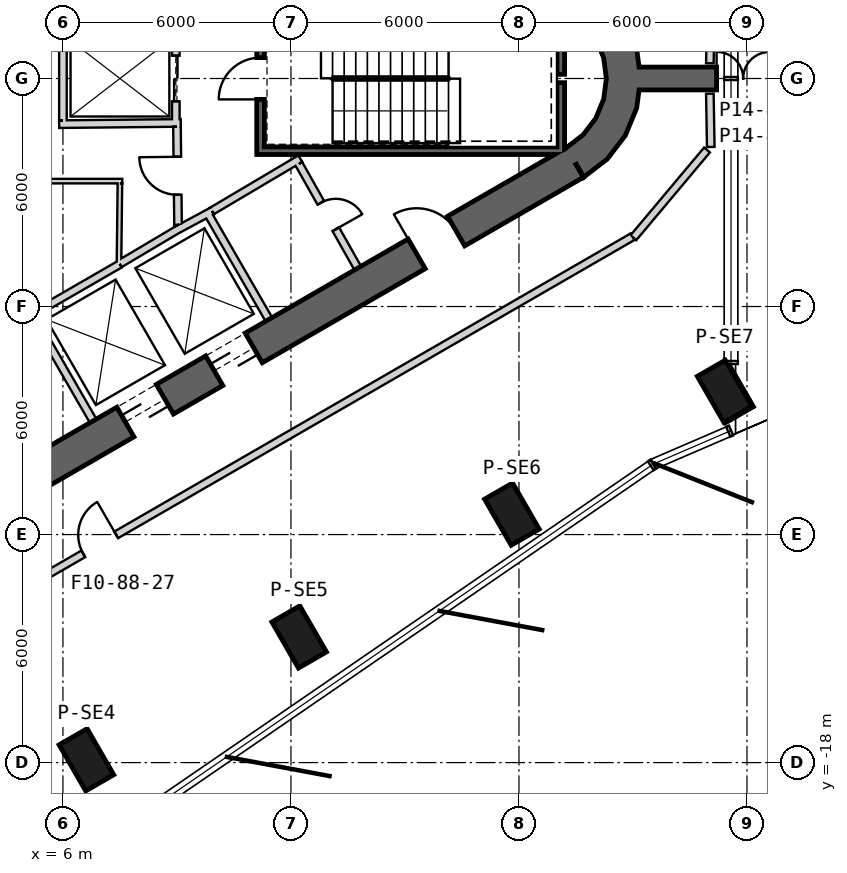
"""IFC4 building model, lengths in metres.
Left out: names, types, materials, properties, quantities, classifications, styles, units other than length and angle.
Written with IfcOpenShell. Run it as: python <this file> out.ifc"""

import sys

from ifc_helpers import new_model, si_unit, direction, frame, frame_2d, origin, origin_2d, place, context, subcontext, project, spatial, polyline, rectangle, outline, extrude, element, fill, save


model = new_model("IFC4")
c1 = context("Model", 3, precision=1e-05, world=origin(), true_north=direction((0.0, 1.0)))
c2 = subcontext(c1, "Body", "Model", "MODEL_VIEW")
j1 = project(units=[si_unit("LENGTHUNIT", "METRE"), si_unit("PLANEANGLEUNIT", "RADIAN")], contexts=[c1])
p1 = place(None, origin())
s1 = spatial("IfcSite", under=j1, at=p1, CompositionType="ELEMENT")
p2 = place(p1, origin())
s2 = spatial("IfcBuilding", under=s1, at=p2, CompositionType="ELEMENT")
p3 = place(p2, frame((0.0, 0.0, 380.6)))
s3 = spatial("IfcBuildingStorey", under=s2, at=p3, CompositionType="ELEMENT", Elevation=380.6)
for number, where, z_axis, x_axis in (
    (1, (6.618, -17.927, 0.0), (0.0, 0.0, 1.0), (0.5, -0.866, 0.0)),
    (2, (12.216, -14.695, 0.0), (0.0, 0.0, 1.0), (0.5, -0.866, 0.0)),
    (3, (17.814, -11.463, 0.0), (0.0, 0.0, 1.0), (0.5, -0.866, 0.0)),
    (4, (23.412, -8.231, 0.0), (0.0, 0.0, 1.0), (0.5, -0.866, 0.0)),
):
    element("IfcColumn", number, at=place(p3, frame(where, z_axis=z_axis, x_axis=x_axis)), inside=s3, PredefinedType="COLUMN", context=c2, shape_type="SweptSolid", body=[
        extrude(rectangle(XDim=1.4, YDim=0.85, at=origin_2d()), origin(), (0.0, 0.0, 1.0), 3.9),
    ])
p4 = place(p3, frame((-7.825, -17.97, 0.0), z_axis=(0.0, 0.0, 1.0), x_axis=(0.866028369851, 0.499994862586, 0.0)))
e5 = element("IfcWall", 5, at=p4, inside=s3, PredefinedType="SHEAR", context=c2, shape_type="SweptSolid", body=[
    extrude(rectangle(XDim=31.523, YDim=0.9, at=frame_2d((15.762, 0.0))), origin(), (0.0, 0.0, 1.0), 3.9),
])
p5 = place(p4, frame((17.862, 0.0, 0.0)))
e6 = element("IfcOpeningElement", 6, at=p5, cuts=e5, PredefinedType="OPENING", context=c2, shape_type="SweptSolid", body=[
    extrude(rectangle(XDim=1.2, YDim=2.4, at=frame_2d((0.6, 1.2))), frame((0.0, 0.46, 0.0), z_axis=(0.0, -1.0, 0.0), x_axis=(1.0, 0.0, 0.0)), (0.0, 0.0, 1.0), 0.92),
])
p6 = place(p4, frame((20.562, 0.0, 0.0)))
e7 = element("IfcOpeningElement", 7, at=p6, cuts=e5, PredefinedType="OPENING", context=c2, shape_type="SweptSolid", body=[
    extrude(rectangle(XDim=1.2, YDim=2.4, at=frame_2d((0.6, 1.2))), frame((0.0, 0.46, 0.0), z_axis=(0.0, -1.0, 0.0), x_axis=(1.0, 0.0, 0.0)), (0.0, 0.0, 1.0), 0.92),
])
p7 = place(p4, frame((26.712, 0.0, 0.0)))
e8 = element("IfcOpeningElement", 8, at=p7, cuts=e5, PredefinedType="OPENING", context=c2, shape_type="SweptSolid", body=[
    extrude(rectangle(XDim=1.2, YDim=2.4, at=frame_2d((0.6, 1.2))), frame((0.0, 0.46, 0.0), z_axis=(0.0, -1.0, 0.0), x_axis=(1.0, 0.0, 0.0)), (0.0, 0.0, 1.0), 0.92),
])
p8 = place(p4, frame((3.612, 0.0, 0.0)))
e9 = element("IfcOpeningElement", 9, at=p8, cuts=e5, PredefinedType="OPENING", context=c2, shape_type="SweptSolid", body=[
    extrude(rectangle(XDim=1.2, YDim=2.4, at=frame_2d((0.6, 1.2))), frame((0.0, 0.46, 0.0), z_axis=(0.0, -1.0, 0.0), x_axis=(1.0, 0.0, 0.0)), (0.0, 0.0, 1.0), 0.92),
])
p9 = place(p3, origin())
e10 = element("IfcWall", 10, at=p9, inside=s3, PredefinedType="SHEAR", context=c2, shape_type="SweptSolid", body=[
    extrude(outline(polyline([(19.7, -2.598), (20.321, -2.121), (20.798, -1.5), (21.098, -0.777), (21.2, 0.0), (21.098, 0.777), (20.798, 1.5), (20.321, 2.121), (19.7, 2.598), (19.25, 1.819), (19.685, 1.485), (20.019, 1.05), (20.229, 0.543), (20.3, 0.0), (20.229, -0.543), (20.019, -1.05), (19.685, -1.485), (19.25, -1.819), (19.7, -2.598)])), origin(), (0.0, 0.0, 1.0), 3.9),
])
p10 = place(p3, frame((21.15, 0.0, 0.0), z_axis=(0.0, 0.0, 1.0), x_axis=(1.0, 0.0, 0.0)))
e11 = element("IfcWall", 11, at=p10, inside=s3, PredefinedType="SHEAR", context=c2, shape_type="SweptSolid", body=[
    extrude(rectangle(XDim=6.455, YDim=0.6, at=frame_2d((3.228, 0.0))), origin(), (0.0, 0.0, 1.0), 3.9),
])
p11 = place(p10, frame((2.05, 0.0, 0.0)))
e12 = element("IfcOpeningElement", 12, at=p11, cuts=e11, PredefinedType="OPENING", context=c2, shape_type="SweptSolid", body=[
    extrude(rectangle(XDim=1.4, YDim=2.4, at=frame_2d((0.7, 1.2))), frame((0.0, 0.31, 0.0), z_axis=(0.0, -1.0, 0.0), x_axis=(1.0, 0.0, 0.0)), (0.0, 0.0, 1.0), 0.62),
])
p12 = place(p3, frame((23.426, -7.345, 1.1), z_axis=(0.0, 0.0, 1.0), x_axis=(0.499991248344, -0.866030456496, 0.0)))
e13 = element("IfcWall", 13, at=p12, inside=s3, PredefinedType="SOLIDWALL", context=c2, shape_type="SweptSolid", body=[
    extrude(rectangle(XDim=1.52, YDim=0.06, at=frame_2d((0.76, 0.0))), origin(), (0.0, 0.0, 1.0), 1.51),
])
p13 = place(p3, frame((23.409, -9.075, 0.9), z_axis=(0.0, 0.0, 1.0), x_axis=(0.865989465428, 0.500062241894, 0.0)))
e14 = element("IfcWall", 14, at=p13, inside=s3, PredefinedType="SOLIDWALL", context=c2, shape_type="SweptSolid", body=[
    extrude(rectangle(XDim=0.85, YDim=0.06, at=frame_2d((0.425, 0.0))), origin(), (0.0, 0.0, 1.0), 2.7),
])
p14 = place(p3, frame((6.795, -9.01, 0.0), z_axis=(0.0, 0.0, 1.0), x_axis=(-0.499984717929, 0.866034226713, 0.0)))
e15 = element("IfcWall", 15, at=p14, inside=s3, PredefinedType="PLUMBINGWALL", context=c2, shape_type="SweptSolid", body=[
    extrude(rectangle(XDim=3.25, YDim=0.2, at=frame_2d((1.625, 0.0))), origin(), (0.0, 0.0, 1.0), 3.6),
])
p15 = place(p3, frame((5.159, -6.236, 0.0), z_axis=(0.0, 0.0, 1.0), x_axis=(0.866036505625, 0.499980770555, 0.0)))
e16 = element("IfcWall", 16, at=p15, inside=s3, PredefinedType="PLUMBINGWALL", context=c2, shape_type="SweptSolid", body=[
    extrude(rectangle(XDim=2.7, YDim=0.2, at=frame_2d((1.35, 0.0))), origin(), (0.0, 0.0, 1.0), 3.6),
])
p16 = place(p3, frame((9.795, -3.525, 0.0), z_axis=(0.0, 0.0, 1.0), x_axis=(0.499984717929, -0.866034226713, 0.0)))
e17 = element("IfcWall", 17, at=p16, inside=s3, PredefinedType="PLUMBINGWALL", context=c2, shape_type="SweptSolid", body=[
    extrude(rectangle(XDim=3.25, YDim=0.2, at=frame_2d((1.625, 0.0))), origin(), (0.0, 0.0, 1.0), 3.6),
])
p17 = place(p3, frame((8.974, -3.999, 0.0), z_axis=(0.0, 0.0, 1.0), x_axis=(0.880907015104, 0.473289373154, 0.0)))
e18 = element("IfcWall", 18, at=p17, inside=s3, PredefinedType="PLUMBINGWALL", context=c2, shape_type="SweptSolid", body=[
    extrude(rectangle(XDim=1.078, YDim=0.2, at=frame_2d((0.539, 0.0))), origin(), (0.0, 0.0, 1.0), 3.6),
])
p18 = place(p3, frame((7.497, -4.886, 0.0), z_axis=(0.0, 0.0, 1.0), x_axis=(0.857516281273, 0.51445682749, 0.0)))
e19 = element("IfcWall", 19, at=p18, inside=s3, PredefinedType="PLUMBINGWALL", context=c2, shape_type="SweptSolid", body=[
    extrude(rectangle(XDim=1.845, YDim=0.2, at=frame_2d((0.922, 0.0))), origin(), (0.0, 0.0, 1.0), 3.6),
])
p19 = place(p3, frame((19.1, -2.0, -0.3), z_axis=(0.0, 0.0, 1.0), x_axis=(0.0, 1.0, 0.0)))
e20 = element("IfcWall", 20, at=p19, inside=s3, PredefinedType="SHEAR", context=c2, shape_type="SweptSolid", body=[
    extrude(rectangle(XDim=1.89, YDim=0.2, at=frame_2d((0.945, 0.0))), origin(), (0.0, 0.0, 1.0), 3.9),
])
p20 = place(p3, frame((19.1, 0.11, -0.3), z_axis=(0.0, 0.0, 1.0), x_axis=(0.0, 1.0, 0.0)))
e21 = element("IfcWall", 21, at=p20, inside=s3, PredefinedType="SHEAR", context=c2, shape_type="SweptSolid", body=[
    extrude(rectangle(XDim=1.69, YDim=0.2, at=frame_2d((0.845, 0.0))), origin(), (0.0, 0.0, 1.0), 3.9),
])
p21 = place(p3, frame((11.1, -1.9, -0.3), z_axis=(0.0, 0.0, 1.0), x_axis=(1.0, 0.0, 0.0)))
e22 = element("IfcWall", 22, at=p21, inside=s3, PredefinedType="SHEAR", context=c2, shape_type="SweptSolid", body=[
    extrude(rectangle(XDim=7.9, YDim=0.2, at=frame_2d((3.95, 0.0))), origin(), (0.0, 0.0, 1.0), 3.9),
])
p22 = place(p3, frame((11.2, -1.8, -0.3), z_axis=(0.0, 0.0, 1.0), x_axis=(0.0, 1.0, 0.0)))
e23 = element("IfcWall", 23, at=p22, inside=s3, PredefinedType="SHEAR", context=c2, shape_type="SweptSolid", body=[
    extrude(rectangle(XDim=3.6, YDim=0.2, at=frame_2d((1.8, 0.0))), origin(), (0.0, 0.0, 1.0), 3.9),
])
p23 = place(p22, frame((1.25, 0.0, 0.3)))
e24 = element("IfcOpeningElement", 24, at=p23, cuts=e23, PredefinedType="OPENING", context=c2, shape_type="SweptSolid", body=[
    extrude(rectangle(XDim=1.1, YDim=2.1, at=frame_2d((0.55, 1.05))), frame((0.0, 0.11, 0.0), z_axis=(0.0, -1.0, 0.0), x_axis=(1.0, 0.0, 0.0)), (0.0, 0.0, 1.0), 0.22),
])
p24 = place(p3, frame((8.97, 1.2, 0.0), z_axis=(0.0, 0.0, 1.0), x_axis=(0.0, -1.0, 0.0)))
e25 = element("IfcWall", 25, at=p24, inside=s3, PredefinedType="PLUMBINGWALL", context=c2, shape_type="SweptSolid", body=[
    extrude(rectangle(XDim=2.4, YDim=0.2, at=frame_2d((1.2, 0.0))), origin(), (0.0, 0.0, 1.0), 3.6),
])
p25 = place(p24, frame((0.6, 0.0, 0.0)))
e26 = element("IfcOpeningElement", 26, at=p25, cuts=e25, PredefinedType="OPENING", context=c2, shape_type="SweptSolid", body=[
    extrude(rectangle(XDim=1.2, YDim=2.4, at=frame_2d((0.6, 1.2))), frame((0.0, 0.11, 0.0), z_axis=(0.0, -1.0, 0.0), x_axis=(1.0, 0.0, 0.0)), (0.0, 0.0, 1.0), 0.22),
])
p26 = place(p3, frame((9.1, -1.169, 0.0), z_axis=(0.0, 0.0, 1.0), x_axis=(-0.999949988, -0.010001074852, 0.0)))
e27 = element("IfcWall", 27, at=p26, inside=s3, PredefinedType="PLUMBINGWALL", context=c2, shape_type="SweptSolid", body=[
    extrude(rectangle(XDim=3.1, YDim=0.2, at=frame_2d((1.55, 0.0))), origin(), (0.0, 0.0, 1.0), 3.6),
])
p27 = place(p3, frame((6.0, -1.104, 0.0), z_axis=(0.0, 0.0, 1.0), x_axis=(0.0, 1.0, 0.0)))
e28 = element("IfcWall", 28, at=p27, inside=s3, PredefinedType="PLUMBINGWALL", context=c2, shape_type="SweptSolid", body=[
    extrude(rectangle(XDim=2.405, YDim=0.2, at=frame_2d((1.202, 0.0))), origin(), (0.0, 0.0, 1.0), 3.6),
])
p28 = place(p3, frame((12.245, -2.109, 0.0), z_axis=(0.0, 0.0, 1.0), x_axis=(-0.860414880418, -0.509594185166, 0.0)))
e29 = element("IfcWall", 29, at=p28, inside=s3, PredefinedType="PARTITIONING", context=c2, shape_type="SweptSolid", body=[
    extrude(rectangle(XDim=2.7, YDim=0.2, at=frame_2d((1.35, 0.0))), origin(), (0.0, 0.0, 1.0), 3.6),
])
p29 = place(p3, frame((13.758, -4.99, 0.0), z_axis=(0.0, 0.0, 1.0), x_axis=(-0.491993409184, 0.87059892334, 0.0)))
e30 = element("IfcWall", 30, at=p29, inside=s3, PredefinedType="PARTITIONING", context=c2, shape_type="SweptSolid", body=[
    extrude(rectangle(XDim=3.15, YDim=0.2, at=frame_2d((1.575, 0.0))), origin(), (0.0, 0.0, 1.0), 3.6),
])
p30 = place(p29, frame((1.175, 0.0, 0.0)))
e31 = element("IfcOpeningElement", 31, at=p30, cuts=e30, PredefinedType="OPENING", context=c2, shape_type="SweptSolid", body=[
    extrude(rectangle(XDim=0.8, YDim=2.1, at=frame_2d((0.4, 1.05))), frame((0.0, 0.11, 0.0), z_axis=(0.0, -1.0, 0.0), x_axis=(1.0, 0.0, 0.0)), (0.0, 0.0, 1.0), 0.22),
])
p31 = place(p3, frame((9.029, -3.851, 0.0), z_axis=(0.0, 0.0, 1.0), x_axis=(-0.010784614026, 0.999941844359, 0.0)))
e32 = element("IfcWall", 32, at=p31, inside=s3, PredefinedType="PARTITIONING", context=c2, shape_type="SweptSolid", body=[
    extrude(rectangle(XDim=2.581, YDim=0.2, at=frame_2d((1.291, 0.0))), origin(), (0.0, 0.0, 1.0), 3.6),
])
p32 = place(p3, frame((5.9, -1.03, 0.0), z_axis=(0.0, 0.0, 1.0), x_axis=(-1.0, 0.0, 0.0)))
e33 = element("IfcWall", 33, at=p32, inside=s3, PredefinedType="PLUMBINGWALL", context=c2, shape_type="SweptSolid", body=[
    extrude(rectangle(XDim=0.4, YDim=0.15, at=frame_2d((0.2, 0.0))), origin(), (0.0, 0.0, 1.0), 3.6),
])
p33 = place(p3, frame((23.023, 0.4, 0.0), z_axis=(0.0, 0.0, 1.0), x_axis=(0.017073489471, 0.999854237355, 0.0)))
e34 = element("IfcWall", 34, at=p33, inside=s3, PredefinedType="PARTITIONING", context=c2, shape_type="SweptSolid", body=[
    extrude(rectangle(XDim=1.273, YDim=0.12, at=frame_2d((0.636, 0.0))), origin(), (0.0, 0.0, 1.0), 3.6),
])
p34 = place(p3, frame((0.669, -15.895, 0.0), z_axis=(0.0, 0.0, 1.0), x_axis=(0.866018980909, 0.500011124582, 0.0)))
e35 = element("IfcWall", 35, at=p34, inside=s3, PredefinedType="PARTITIONING", context=c2, shape_type="SweptSolid", body=[
    extrude(rectangle(XDim=6.808, YDim=0.2, at=frame_2d((3.404, 0.0))), origin(), (0.0, 0.0, 1.0), 3.07),
])
p35 = place(p34, frame((3.056, 0.0, 0.0)))
e36 = element("IfcOpeningElement", 36, at=p35, cuts=e35, PredefinedType="OPENING", context=c2, shape_type="SweptSolid", body=[
    extrude(rectangle(XDim=1.0, YDim=2.1, at=frame_2d((0.5, 1.05))), frame((0.0, 0.11, 0.0), z_axis=(0.0, -1.0, 0.0), x_axis=(1.0, 0.0, 0.0)), (0.0, 0.0, 1.0), 0.22),
])
p36 = place(p3, frame((6.565, -12.491, 0.0), z_axis=(0.0, 0.0, 1.0), x_axis=(0.866025195272, 0.500000361154, 0.0)))
e37 = element("IfcWall", 37, at=p36, inside=s3, PredefinedType="PARTITIONING", context=c2, shape_type="SweptSolid", body=[
    extrude(rectangle(XDim=16.654, YDim=0.2, at=frame_2d((8.327, 0.0))), origin(), (0.0, 0.0, 1.0), 2.97),
])
p37 = place(p36, frame((7.856, 0.0, 0.0)))
e38 = element("IfcOpeningElement", 38, at=p37, cuts=e37, PredefinedType="OPENING", context=c2, shape_type="SweptSolid", body=[
    extrude(rectangle(XDim=1.0, YDim=2.1, at=frame_2d((0.5, 1.05))), frame((0.0, 0.11, 0.0), z_axis=(0.0, -1.0, 0.0), x_axis=(1.0, 0.0, 0.0)), (0.0, 0.0, 1.0), 0.22),
])
p38 = place(p3, frame((23.047, -1.801, 0.0), z_axis=(0.0, 0.0, 1.0), x_axis=(-0.017070682919, 0.999854285276, 0.0)))
e39 = element("IfcWall", 39, at=p38, inside=s3, PredefinedType="PARTITIONING", context=c2, shape_type="SweptSolid", body=[
    extrude(rectangle(XDim=1.402, YDim=0.2, at=frame_2d((0.701, 0.0))), origin(), (0.0, 0.0, 1.0), 3.6),
])
p39 = place(p3, frame((21.01, -4.191, 0.0), z_axis=(0.0, 0.0, 1.0), x_axis=(0.642808479337, 0.766026930918, 0.0)))
e40 = element("IfcWall", 40, at=p39, inside=s3, PredefinedType="PARTITIONING", context=c2, shape_type="SweptSolid", body=[
    extrude(rectangle(XDim=3.016, YDim=0.2, at=frame_2d((1.508, 0.0))), origin(), (0.0, 0.0, 1.0), 3.6),
])
p40 = place(p3, frame((6.642, -12.562, 0.0), z_axis=(0.0, 0.0, 1.0), x_axis=(0.565873344154, -0.82449218212, 0.0)))
e41 = element("IfcWall", 41, at=p40, inside=s3, PredefinedType="PARTITIONING", context=c2, shape_type="SweptSolid", body=[
    extrude(rectangle(XDim=6.435, YDim=0.2, at=frame_2d((3.218, 0.0))), origin(), (0.0, 0.0, 1.0), 3.6),
])
p41 = place(p23, origin())
e42 = element("IfcDoor", 42, at=p41, inside=s3, OperationType="SINGLE_SWING_RIGHT", PredefinedType="USERDEFINED", context=c2, shape_type="SweptSolid", body=[
    extrude(rectangle(XDim=1.1, YDim=2.1, at=frame_2d((0.55, 1.05))), frame((0.0, 0.025, 0.0), z_axis=(0.0, -1.0, 0.0), x_axis=(1.0, 0.0, 0.0)), (0.0, 0.0, 1.0), 0.05),
])
fill(e24, e42)
p42 = place(p25, origin())
e43 = element("IfcDoor", 43, at=p42, inside=s3, OperationType="SLIDING_TO_LEFT", PredefinedType="USERDEFINED", context=c2, shape_type="SweptSolid", body=[
    extrude(rectangle(XDim=1.2, YDim=2.4, at=frame_2d((0.6, 1.2))), frame((0.0, 0.025, 0.0), z_axis=(0.0, -1.0, 0.0), x_axis=(1.0, 0.0, 0.0)), (0.0, 0.0, 1.0), 0.05),
])
fill(e26, e43)
p43 = place(p30, origin())
e44 = element("IfcDoor", 44, at=p43, inside=s3, OperationType="SINGLE_SWING_LEFT", PredefinedType="USERDEFINED", context=c2, shape_type="SweptSolid", body=[
    extrude(rectangle(XDim=0.8, YDim=2.1, at=frame_2d((0.4, 1.05))), frame((0.0, 0.025, 0.0), z_axis=(0.0, -1.0, 0.0), x_axis=(1.0, 0.0, 0.0)), (0.0, 0.0, 1.0), 0.05),
])
fill(e31, e44)
p44 = place(p37, origin())
e45 = element("IfcDoor", 45, at=p44, inside=s3, OperationType="SINGLE_SWING_LEFT", PredefinedType="USERDEFINED", context=c2, shape_type="SweptSolid", body=[
    extrude(rectangle(XDim=1.0, YDim=2.1, at=frame_2d((0.5, 1.05))), frame((0.0, 0.025, 0.0), z_axis=(0.0, -1.0, 0.0), x_axis=(1.0, 0.0, 0.0)), (0.0, 0.0, 1.0), 0.05),
])
fill(e38, e45)
p45 = place(p5, origin())
e46 = element("IfcDoor", 46, at=p45, inside=s3, OperationType="SLIDING_TO_LEFT", PredefinedType="USERDEFINED", context=c2, shape_type="SweptSolid", body=[
    extrude(rectangle(XDim=1.2, YDim=2.4, at=frame_2d((0.6, 1.2))), frame((0.0, 0.025, 0.0), z_axis=(0.0, -1.0, 0.0), x_axis=(1.0, 0.0, 0.0)), (0.0, 0.0, 1.0), 0.05),
])
fill(e6, e46)
p46 = place(p6, origin())
e47 = element("IfcDoor", 47, at=p46, inside=s3, OperationType="SLIDING_TO_LEFT", PredefinedType="USERDEFINED", context=c2, shape_type="SweptSolid", body=[
    extrude(rectangle(XDim=1.2, YDim=2.4, at=frame_2d((0.6, 1.2))), frame((0.0, 0.025, 0.0), z_axis=(0.0, -1.0, 0.0), x_axis=(1.0, 0.0, 0.0)), (0.0, 0.0, 1.0), 0.05),
])
fill(e7, e47)
p47 = place(p7, origin())
e48 = element("IfcDoor", 48, at=p47, inside=s3, OperationType="SINGLE_SWING_RIGHT", PredefinedType="USERDEFINED", context=c2, shape_type="SweptSolid", body=[
    extrude(rectangle(XDim=1.2, YDim=2.4, at=frame_2d((0.6, 1.2))), frame((0.0, 0.025, 0.0), z_axis=(0.0, -1.0, 0.0), x_axis=(1.0, 0.0, 0.0)), (0.0, 0.0, 1.0), 0.05),
])
fill(e8, e48)
p48 = place(p11, origin())
e49 = element("IfcDoor", 49, at=p48, inside=s3, OperationType="DOUBLE_DOOR_SINGLE_SWING", PredefinedType="NOTDEFINED", context=c2, shape_type="SweptSolid", body=[
    extrude(rectangle(XDim=1.4, YDim=2.4, at=frame_2d((0.7, 1.2))), frame((0.0, 0.025, 0.0), z_axis=(0.0, -1.0, 0.0), x_axis=(1.0, 0.0, 0.0)), (0.0, 0.0, 1.0), 0.05),
])
fill(e12, e49)
save(model, sys.argv[1])
